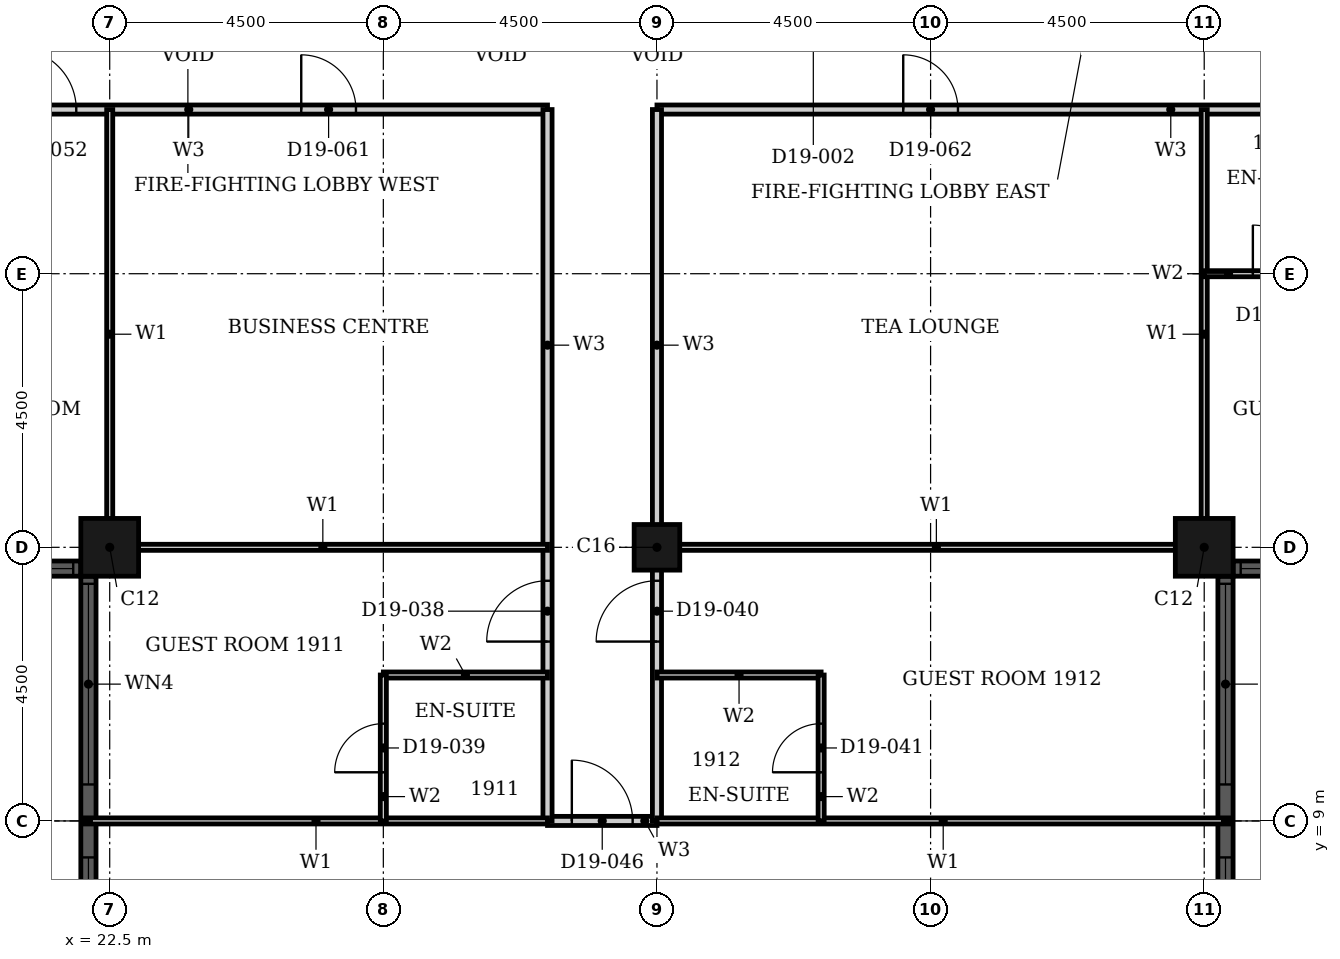
"""IFC4 building model, lengths in metres.
Left out: names, types, materials, properties, quantities, classifications, styles, units other than length and angle.
Written with IfcOpenShell. Run it as: python <this file> out.ifc"""

import sys

from ifc_helpers import new_model, si_unit, direction, frame, frame_2d, origin, origin_2d, place, context, subcontext, project, spatial, rectangle, hollow_rectangle, extrude, element, fill, save


model = new_model("IFC4")
c1 = context("Model", 3, precision=1e-05, world=origin(), true_north=direction((0.0, 1.0)))
c2 = subcontext(c1, "Body", "Model", "MODEL_VIEW")
j1 = project(units=[si_unit("LENGTHUNIT", "METRE"), si_unit("PLANEANGLEUNIT", "RADIAN")], contexts=[c1])
p1 = place(None, origin())
s1 = spatial("IfcSite", under=j1, at=p1, CompositionType="ELEMENT")
p2 = place(p1, origin())
s2 = spatial("IfcBuilding", under=s1, at=p2, CompositionType="ELEMENT")
p3 = place(p2, frame((0.0, 0.0, 81.6)))
s3 = spatial("IfcBuildingStorey", under=s2, at=p3, CompositionType="ELEMENT", Elevation=81.6)
for number, where, z_axis, x_axis in (
    (1, (40.5, 13.5, 0.0), (0.0, 0.0, 1.0), (1.0, 0.0, 0.0)),
    (2, (22.5, 13.5, 0.0), (0.0, 0.0, 1.0), (1.0, 0.0, 0.0)),
):
    element("IfcColumn", number, at=place(p3, frame(where, z_axis=z_axis, x_axis=x_axis)), inside=s3, PredefinedType="COLUMN", context=c2, shape_type="SweptSolid", body=[
        extrude(hollow_rectangle(XDim=0.95, YDim=0.95, WallThickness=0.03, at=origin_2d()), origin(), (0.0, 0.0, 1.0), 3.6),
    ])
p4 = place(p3, frame((31.5, 13.5, 0.0), z_axis=(0.0, 0.0, 1.0), x_axis=(1.0, 0.0, 0.0)))
e3 = element("IfcColumn", 3, at=p4, inside=s3, PredefinedType="COLUMN", context=c2, shape_type="SweptSolid", body=[
    extrude(hollow_rectangle(XDim=0.75, YDim=0.75, WallThickness=0.024, at=origin_2d()), origin(), (0.0, 0.0, 1.0), 3.6),
])
p5 = place(p3, frame((40.85, 4.975, 0.0), z_axis=(0.0, 0.0, 1.0), x_axis=(0.0, 1.0, 0.0)))
e4 = element("IfcWall", 4, at=p5, inside=s3, PredefinedType="SOLIDWALL", context=c2, shape_type="SweptSolid", body=[
    extrude(rectangle(XDim=8.05, YDim=0.25, at=frame_2d((4.025, 0.0))), origin(), (0.0, 0.0, 1.0), 3.6),
])
p6 = place(p5, frame((0.125, 0.0, 0.9)))
e5 = element("IfcOpeningElement", 5, at=p6, cuts=e4, PredefinedType="OPENING", context=c2, shape_type="SweptSolid", body=[
    extrude(rectangle(XDim=3.3, YDim=2.08, at=frame_2d((1.65, 1.04))), frame((0.0, 0.135, 0.0), z_axis=(0.0, -1.0, 0.0), x_axis=(1.0, 0.0, 0.0)), (0.0, 0.0, 1.0), 0.27),
])
p7 = place(p5, frame((4.625, 0.0, 0.9)))
e6 = element("IfcOpeningElement", 6, at=p7, cuts=e4, PredefinedType="OPENING", context=c2, shape_type="SweptSolid", body=[
    extrude(rectangle(XDim=3.3, YDim=2.08, at=frame_2d((1.65, 1.04))), frame((0.0, 0.135, 0.0), z_axis=(0.0, -1.0, 0.0), x_axis=(1.0, 0.0, 0.0)), (0.0, 0.0, 1.0), 0.27),
])
p8 = place(p3, frame((40.975, 13.15, 0.0), z_axis=(0.0, 0.0, 1.0), x_axis=(1.0, 0.0, 0.0)))
e7 = element("IfcWall", 7, at=p8, inside=s3, PredefinedType="SOLIDWALL", context=c2, shape_type="SweptSolid", body=[
    extrude(rectangle(XDim=3.55, YDim=0.25, at=frame_2d((1.775, 0.0))), origin(), (0.0, 0.0, 1.0), 3.6),
])
p9 = place(p8, frame((0.125, 0.0, 0.9)))
e8 = element("IfcOpeningElement", 8, at=p9, cuts=e7, PredefinedType="OPENING", context=c2, shape_type="SweptSolid", body=[
    extrude(rectangle(XDim=3.3, YDim=2.08, at=frame_2d((1.65, 1.04))), frame((0.0, 0.135, 0.0), z_axis=(0.0, -1.0, 0.0), x_axis=(1.0, 0.0, 0.0)), (0.0, 0.0, 1.0), 0.27),
])
p10 = place(p3, frame((18.475, 13.15, 0.0), z_axis=(0.0, 0.0, 1.0), x_axis=(1.0, 0.0, 0.0)))
e9 = element("IfcWall", 9, at=p10, inside=s3, PredefinedType="SOLIDWALL", context=c2, shape_type="SweptSolid", body=[
    extrude(rectangle(XDim=3.55, YDim=0.25, at=frame_2d((1.775, 0.0))), origin(), (0.0, 0.0, 1.0), 3.6),
])
p11 = place(p10, frame((0.125, 0.0, 0.9)))
e10 = element("IfcOpeningElement", 10, at=p11, cuts=e9, PredefinedType="OPENING", context=c2, shape_type="SweptSolid", body=[
    extrude(rectangle(XDim=3.3, YDim=2.08, at=frame_2d((1.65, 1.04))), frame((0.0, 0.135, 0.0), z_axis=(0.0, -1.0, 0.0), x_axis=(1.0, 0.0, 0.0)), (0.0, 0.0, 1.0), 0.27),
])
p12 = place(p3, frame((22.15, 13.025, 0.0), z_axis=(0.0, 0.0, 1.0), x_axis=(0.0, -1.0, 0.0)))
e11 = element("IfcWall", 11, at=p12, inside=s3, PredefinedType="SOLIDWALL", context=c2, shape_type="SweptSolid", body=[
    extrude(rectangle(XDim=8.05, YDim=0.25, at=frame_2d((4.025, 0.0))), origin(), (0.0, 0.0, 1.0), 3.6),
])
p13 = place(p12, frame((0.125, 0.0, 0.9)))
e12 = element("IfcOpeningElement", 12, at=p13, cuts=e11, PredefinedType="OPENING", context=c2, shape_type="SweptSolid", body=[
    extrude(rectangle(XDim=3.3, YDim=2.08, at=frame_2d((1.65, 1.04))), frame((0.0, 0.135, 0.0), z_axis=(0.0, -1.0, 0.0), x_axis=(1.0, 0.0, 0.0)), (0.0, 0.0, 1.0), 0.27),
])
p14 = place(p12, frame((4.625, 0.0, 0.9)))
e13 = element("IfcOpeningElement", 13, at=p14, cuts=e11, PredefinedType="OPENING", context=c2, shape_type="SweptSolid", body=[
    extrude(rectangle(XDim=3.3, YDim=2.08, at=frame_2d((1.65, 1.04))), frame((0.0, 0.135, 0.0), z_axis=(0.0, -1.0, 0.0), x_axis=(1.0, 0.0, 0.0)), (0.0, 0.0, 1.0), 0.27),
])
p15 = place(p3, frame((31.5, 20.7, 0.0), z_axis=(0.0, 0.0, 1.0), x_axis=(1.0, 0.0, 0.0)))
e14 = element("IfcWall", 14, at=p15, inside=s3, PredefinedType="PARTITIONING", context=c2, shape_type="SweptSolid", body=[
    extrude(rectangle(XDim=15.3, YDim=0.15, at=frame_2d((7.65, 0.0))), origin(), (0.0, 0.0, 1.0), 3.3),
])
p16 = place(p15, frame((11.95, 0.0, 0.0)))
e15 = element("IfcOpeningElement", 15, at=p16, cuts=e14, PredefinedType="OPENING", context=c2, shape_type="SweptSolid", body=[
    extrude(rectangle(XDim=1.0, YDim=2.1, at=frame_2d((0.5, 1.05))), frame((0.0, 0.085, 0.0), z_axis=(0.0, -1.0, 0.0), x_axis=(1.0, 0.0, 0.0)), (0.0, 0.0, 1.0), 0.17),
])
p17 = place(p15, frame((13.95, 0.0, 0.0)))
e16 = element("IfcOpeningElement", 16, at=p17, cuts=e14, PredefinedType="OPENING", context=c2, shape_type="SweptSolid", body=[
    extrude(rectangle(XDim=0.9, YDim=2.1, at=frame_2d((0.45, 1.05))), frame((0.0, 0.085, 0.0), z_axis=(0.0, -1.0, 0.0), x_axis=(1.0, 0.0, 0.0)), (0.0, 0.0, 1.0), 0.17),
])
p18 = place(p15, frame((4.05, 0.0, 0.0)))
e17 = element("IfcOpeningElement", 17, at=p18, cuts=e14, PredefinedType="OPENING", context=c2, shape_type="SweptSolid", body=[
    extrude(rectangle(XDim=0.9, YDim=2.1, at=frame_2d((0.45, 1.05))), frame((0.0, 0.085, 0.0), z_axis=(0.0, -1.0, 0.0), x_axis=(1.0, 0.0, 0.0)), (0.0, 0.0, 1.0), 0.17),
])
p19 = place(p3, frame((16.2, 20.7, 0.0), z_axis=(0.0, 0.0, 1.0), x_axis=(1.0, 0.0, 0.0)))
e18 = element("IfcWall", 18, at=p19, inside=s3, PredefinedType="PARTITIONING", context=c2, shape_type="SweptSolid", body=[
    extrude(rectangle(XDim=13.5, YDim=0.15, at=frame_2d((6.75, 0.0))), origin(), (0.0, 0.0, 1.0), 3.3),
])
p20 = place(p19, frame((4.75, 0.0, 0.0)))
e19 = element("IfcOpeningElement", 19, at=p20, cuts=e18, PredefinedType="OPENING", context=c2, shape_type="SweptSolid", body=[
    extrude(rectangle(XDim=1.0, YDim=2.1, at=frame_2d((0.5, 1.05))), frame((0.0, 0.085, 0.0), z_axis=(0.0, -1.0, 0.0), x_axis=(1.0, 0.0, 0.0)), (0.0, 0.0, 1.0), 0.17),
])
p21 = place(p19, frame((0.45, 0.0, 0.0)))
e20 = element("IfcOpeningElement", 20, at=p21, cuts=e18, PredefinedType="OPENING", context=c2, shape_type="SweptSolid", body=[
    extrude(rectangle(XDim=0.9, YDim=2.1, at=frame_2d((0.45, 1.05))), frame((0.0, 0.085, 0.0), z_axis=(0.0, -1.0, 0.0), x_axis=(1.0, 0.0, 0.0)), (0.0, 0.0, 1.0), 0.17),
])
p22 = place(p19, frame((9.45, 0.0, 0.0)))
e21 = element("IfcOpeningElement", 21, at=p22, cuts=e18, PredefinedType="OPENING", context=c2, shape_type="SweptSolid", body=[
    extrude(rectangle(XDim=0.9, YDim=2.1, at=frame_2d((0.45, 1.05))), frame((0.0, 0.085, 0.0), z_axis=(0.0, -1.0, 0.0), x_axis=(1.0, 0.0, 0.0)), (0.0, 0.0, 1.0), 0.17),
])
p23 = place(p3, frame((29.7, 9.0, 0.0), z_axis=(0.0, 0.0, 1.0), x_axis=(1.0, 0.0, 0.0)))
e22 = element("IfcWall", 22, at=p23, inside=s3, PredefinedType="PARTITIONING", context=c2, shape_type="SweptSolid", body=[
    extrude(rectangle(XDim=1.8, YDim=0.15, at=frame_2d((0.9, 0.0))), origin(), (0.0, 0.0, 1.0), 3.3),
])
p24 = place(p23, frame((0.4, 0.0, 0.0)))
e23 = element("IfcOpeningElement", 23, at=p24, cuts=e22, PredefinedType="OPENING", context=c2, shape_type="SweptSolid", body=[
    extrude(rectangle(XDim=1.0, YDim=2.1, at=frame_2d((0.5, 1.05))), frame((0.0, 0.085, 0.0), z_axis=(0.0, -1.0, 0.0), x_axis=(1.0, 0.0, 0.0)), (0.0, 0.0, 1.0), 0.17),
])
p25 = place(p3, frame((29.7, 9.0, 0.0), z_axis=(0.0, 0.0, 1.0), x_axis=(0.0, 1.0, 0.0)))
e24 = element("IfcWall", 24, at=p25, inside=s3, PredefinedType="PARTITIONING", context=c2, shape_type="SweptSolid", body=[
    extrude(rectangle(XDim=11.7, YDim=0.15, at=frame_2d((5.85, 0.0))), origin(), (0.0, 0.0, 1.0), 3.3),
])
p26 = place(p25, frame((2.95, 0.0, 0.0)))
e25 = element("IfcOpeningElement", 25, at=p26, cuts=e24, PredefinedType="OPENING", context=c2, shape_type="SweptSolid", body=[
    extrude(rectangle(XDim=1.0, YDim=2.1, at=frame_2d((0.5, 1.05))), frame((0.0, 0.085, 0.0), z_axis=(0.0, -1.0, 0.0), x_axis=(1.0, 0.0, 0.0)), (0.0, 0.0, 1.0), 0.17),
])
p27 = place(p3, frame((31.5, 9.0, 0.0), z_axis=(0.0, 0.0, 1.0), x_axis=(0.0, 1.0, 0.0)))
e26 = element("IfcWall", 26, at=p27, inside=s3, PredefinedType="PARTITIONING", context=c2, shape_type="SweptSolid", body=[
    extrude(rectangle(XDim=11.7, YDim=0.15, at=frame_2d((5.85, 0.0))), origin(), (0.0, 0.0, 1.0), 2.58),
])
p28 = place(p27, frame((2.95, 0.0, 0.0)))
e27 = element("IfcOpeningElement", 27, at=p28, cuts=e26, PredefinedType="OPENING", context=c2, shape_type="SweptSolid", body=[
    extrude(rectangle(XDim=1.0, YDim=2.1, at=frame_2d((0.5, 1.05))), frame((0.0, 0.085, 0.0), z_axis=(0.0, -1.0, 0.0), x_axis=(1.0, 0.0, 0.0)), (0.0, 0.0, 1.0), 0.17),
])
p29 = place(p3, frame((31.5, 13.5, 0.0), z_axis=(0.0, 0.0, 1.0), x_axis=(1.0, 0.0, 0.0)))
e28 = element("IfcWall", 28, at=p29, inside=s3, PredefinedType="PARTITIONING", context=c2, shape_type="SweptSolid", body=[
    extrude(rectangle(XDim=9.19, YDim=0.1, at=frame_2d((4.595, 0.0))), origin(), (0.0, 0.0, 1.0), 2.38),
])
p30 = place(p3, frame((22.31, 13.5, 0.0), z_axis=(0.0, 0.0, 1.0), x_axis=(1.0, 0.0, 0.0)))
e29 = element("IfcWall", 29, at=p30, inside=s3, PredefinedType="PARTITIONING", context=c2, shape_type="SweptSolid", body=[
    extrude(rectangle(XDim=7.39, YDim=0.1, at=frame_2d((3.695, 0.0))), origin(), (0.0, 0.0, 1.0), 2.38),
])
p31 = place(p3, frame((31.5, 9.0, 0.0), z_axis=(0.0, 0.0, 1.0), x_axis=(1.0, 0.0, 0.0)))
e30 = element("IfcWall", 30, at=p31, inside=s3, PredefinedType="PARTITIONING", context=c2, shape_type="SweptSolid", body=[
    extrude(rectangle(XDim=9.415, YDim=0.1, at=frame_2d((4.708, 0.0))), origin(), (0.0, 0.0, 1.0), 3.3),
])
p32 = place(p3, frame((22.085, 9.0, 0.0), z_axis=(0.0, 0.0, 1.0), x_axis=(1.0, 0.0, 0.0)))
e31 = element("IfcWall", 31, at=p32, inside=s3, PredefinedType="PARTITIONING", context=c2, shape_type="SweptSolid", body=[
    extrude(rectangle(XDim=7.615, YDim=0.1, at=frame_2d((3.808, 0.0))), origin(), (0.0, 0.0, 1.0), 3.3),
])
for number, where, z_axis, x_axis in (
    (32, (22.5, 13.31, 0.0), (0.0, 0.0, 1.0), (0.0, 1.0, 0.0)),
    (33, (40.5, 13.31, 0.0), (0.0, 0.0, 1.0), (0.0, 1.0, 0.0)),
):
    element("IfcWall", number, at=place(p3, frame(where, z_axis=z_axis, x_axis=x_axis)), inside=s3, PredefinedType="PARTITIONING", context=c2, shape_type="SweptSolid", body=[
        extrude(rectangle(XDim=7.39, YDim=0.1, at=frame_2d((3.695, 0.0))), origin(), (0.0, 0.0, 1.0), 3.3),
    ])
for number, where, z_axis, x_axis in (
    (34, (31.5, 11.4, 0.0), (0.0, 0.0, 1.0), (1.0, 0.0, 0.0)),
    (35, (27.0, 11.4, 0.0), (0.0, 0.0, 1.0), (1.0, 0.0, 0.0)),
):
    element("IfcWall", number, at=place(p3, frame(where, z_axis=z_axis, x_axis=x_axis)), inside=s3, PredefinedType="PARTITIONING", context=c2, shape_type="SweptSolid", body=[
        extrude(rectangle(XDim=2.7, YDim=0.1, at=frame_2d((1.35, 0.0))), origin(), (0.0, 0.0, 1.0), 3.3),
    ])
p33 = place(p3, frame((40.5, 18.0, 0.0), z_axis=(0.0, 0.0, 1.0), x_axis=(1.0, 0.0, 0.0)))
e36 = element("IfcWall", 36, at=p33, inside=s3, PredefinedType="PARTITIONING", context=c2, shape_type="SweptSolid", body=[
    extrude(rectangle(XDim=2.4, YDim=0.1, at=frame_2d((1.2, 0.0))), origin(), (0.0, 0.0, 1.0), 3.3),
])
p34 = place(p33, frame((0.8, 0.0, 0.0)))
e37 = element("IfcOpeningElement", 37, at=p34, cuts=e36, PredefinedType="OPENING", context=c2, shape_type="SweptSolid", body=[
    extrude(rectangle(XDim=0.8, YDim=2.1, at=frame_2d((0.4, 1.05))), frame((0.0, 0.06, 0.0), z_axis=(0.0, -1.0, 0.0), x_axis=(1.0, 0.0, 0.0)), (0.0, 0.0, 1.0), 0.12),
])
p35 = place(p3, frame((27.0, 9.0, 0.0), z_axis=(0.0, 0.0, 1.0), x_axis=(0.0, 1.0, 0.0)))
e38 = element("IfcWall", 38, at=p35, inside=s3, PredefinedType="PARTITIONING", context=c2, shape_type="SweptSolid", body=[
    extrude(rectangle(XDim=2.4, YDim=0.1, at=frame_2d((1.2, 0.0))), origin(), (0.0, 0.0, 1.0), 2.58),
])
p36 = place(p35, frame((0.8, 0.0, 0.0)))
e39 = element("IfcOpeningElement", 39, at=p36, cuts=e38, PredefinedType="OPENING", context=c2, shape_type="SweptSolid", body=[
    extrude(rectangle(XDim=0.8, YDim=2.1, at=frame_2d((0.4, 1.05))), frame((0.0, 0.06, 0.0), z_axis=(0.0, -1.0, 0.0), x_axis=(1.0, 0.0, 0.0)), (0.0, 0.0, 1.0), 0.12),
])
p37 = place(p3, frame((34.2, 9.0, 0.0), z_axis=(0.0, 0.0, 1.0), x_axis=(0.0, 1.0, 0.0)))
e40 = element("IfcWall", 40, at=p37, inside=s3, PredefinedType="PARTITIONING", context=c2, shape_type="SweptSolid", body=[
    extrude(rectangle(XDim=2.4, YDim=0.1, at=frame_2d((1.2, 0.0))), origin(), (0.0, 0.0, 1.0), 3.3),
])
p38 = place(p37, frame((0.8, 0.0, 0.0)))
e41 = element("IfcOpeningElement", 41, at=p38, cuts=e40, PredefinedType="OPENING", context=c2, shape_type="SweptSolid", body=[
    extrude(rectangle(XDim=0.8, YDim=2.1, at=frame_2d((0.4, 1.05))), frame((0.0, 0.06, 0.0), z_axis=(0.0, -1.0, 0.0), x_axis=(1.0, 0.0, 0.0)), (0.0, 0.0, 1.0), 0.12),
])
p39 = place(p6, origin())
e42 = element("IfcWindow", 42, at=p39, inside=s3, PartitioningType="SINGLE_PANEL", PredefinedType="WINDOW", context=c2, shape_type="SweptSolid", body=[
    extrude(rectangle(XDim=3.3, YDim=2.08, at=frame_2d((1.65, 1.04))), frame((0.0, 0.03, 0.0), z_axis=(0.0, -1.0, 0.0), x_axis=(1.0, 0.0, 0.0)), (0.0, 0.0, 1.0), 0.06),
])
fill(e5, e42)
p40 = place(p7, origin())
e43 = element("IfcWindow", 43, at=p40, inside=s3, PartitioningType="SINGLE_PANEL", PredefinedType="WINDOW", context=c2, shape_type="SweptSolid", body=[
    extrude(rectangle(XDim=3.3, YDim=2.08, at=frame_2d((1.65, 1.04))), frame((0.0, 0.03, 0.0), z_axis=(0.0, -1.0, 0.0), x_axis=(1.0, 0.0, 0.0)), (0.0, 0.0, 1.0), 0.06),
])
fill(e6, e43)
p41 = place(p9, origin())
e44 = element("IfcWindow", 44, at=p41, inside=s3, PartitioningType="SINGLE_PANEL", PredefinedType="WINDOW", context=c2, shape_type="SweptSolid", body=[
    extrude(rectangle(XDim=3.3, YDim=2.08, at=frame_2d((1.65, 1.04))), frame((0.0, 0.03, 0.0), z_axis=(0.0, -1.0, 0.0), x_axis=(1.0, 0.0, 0.0)), (0.0, 0.0, 1.0), 0.06),
])
fill(e8, e44)
p42 = place(p11, origin())
e45 = element("IfcWindow", 45, at=p42, inside=s3, PartitioningType="SINGLE_PANEL", PredefinedType="WINDOW", context=c2, shape_type="SweptSolid", body=[
    extrude(rectangle(XDim=3.3, YDim=2.08, at=frame_2d((1.65, 1.04))), frame((0.0, 0.03, 0.0), z_axis=(0.0, -1.0, 0.0), x_axis=(1.0, 0.0, 0.0)), (0.0, 0.0, 1.0), 0.06),
])
fill(e10, e45)
p43 = place(p13, origin())
e46 = element("IfcWindow", 46, at=p43, inside=s3, PartitioningType="SINGLE_PANEL", PredefinedType="WINDOW", context=c2, shape_type="SweptSolid", body=[
    extrude(rectangle(XDim=3.3, YDim=2.08, at=frame_2d((1.65, 1.04))), frame((0.0, 0.03, 0.0), z_axis=(0.0, -1.0, 0.0), x_axis=(1.0, 0.0, 0.0)), (0.0, 0.0, 1.0), 0.06),
])
fill(e12, e46)
p44 = place(p14, origin())
e47 = element("IfcWindow", 47, at=p44, inside=s3, PartitioningType="SINGLE_PANEL", PredefinedType="WINDOW", context=c2, shape_type="SweptSolid", body=[
    extrude(rectangle(XDim=3.3, YDim=2.08, at=frame_2d((1.65, 1.04))), frame((0.0, 0.03, 0.0), z_axis=(0.0, -1.0, 0.0), x_axis=(1.0, 0.0, 0.0)), (0.0, 0.0, 1.0), 0.06),
])
fill(e13, e47)
p45 = place(p26, origin())
e48 = element("IfcDoor", 48, at=p45, inside=s3, OperationType="SINGLE_SWING_RIGHT", PredefinedType="DOOR", context=c2, shape_type="SweptSolid", body=[
    extrude(rectangle(XDim=1.0, YDim=2.1, at=frame_2d((0.5, 1.05))), frame((0.0, 0.025, 0.0), z_axis=(0.0, -1.0, 0.0), x_axis=(1.0, 0.0, 0.0)), (0.0, 0.0, 1.0), 0.05),
])
fill(e25, e48)
p46 = place(p36, origin())
e49 = element("IfcDoor", 49, at=p46, inside=s3, OperationType="SINGLE_SWING_RIGHT", PredefinedType="DOOR", context=c2, shape_type="SweptSolid", body=[
    extrude(rectangle(XDim=0.8, YDim=2.1, at=frame_2d((0.4, 1.05))), frame((0.0, 0.025, 0.0), z_axis=(0.0, -1.0, 0.0), x_axis=(1.0, 0.0, 0.0)), (0.0, 0.0, 1.0), 0.05),
])
fill(e39, e49)
p47 = place(p28, origin())
e50 = element("IfcDoor", 50, at=p47, inside=s3, OperationType="SINGLE_SWING_RIGHT", PredefinedType="DOOR", context=c2, shape_type="SweptSolid", body=[
    extrude(rectangle(XDim=1.0, YDim=2.1, at=frame_2d((0.5, 1.05))), frame((0.0, 0.025, 0.0), z_axis=(0.0, -1.0, 0.0), x_axis=(1.0, 0.0, 0.0)), (0.0, 0.0, 1.0), 0.05),
])
fill(e27, e50)
p48 = place(p38, origin())
e51 = element("IfcDoor", 51, at=p48, inside=s3, OperationType="SINGLE_SWING_LEFT", PredefinedType="DOOR", context=c2, shape_type="SweptSolid", body=[
    extrude(rectangle(XDim=0.8, YDim=2.1, at=frame_2d((0.4, 1.05))), frame((0.0, 0.025, 0.0), z_axis=(0.0, -1.0, 0.0), x_axis=(1.0, 0.0, 0.0)), (0.0, 0.0, 1.0), 0.05),
])
fill(e41, e51)
p49 = place(p24, origin())
e52 = element("IfcDoor", 52, at=p49, inside=s3, OperationType="SINGLE_SWING_LEFT", PredefinedType="DOOR", context=c2, shape_type="SweptSolid", body=[
    extrude(rectangle(XDim=1.0, YDim=2.1, at=frame_2d((0.5, 1.05))), frame((0.0, 0.025, 0.0), z_axis=(0.0, -1.0, 0.0), x_axis=(1.0, 0.0, 0.0)), (0.0, 0.0, 1.0), 0.05),
])
fill(e23, e52)
p50 = place(p20, origin())
e53 = element("IfcDoor", 53, at=p50, inside=s3, OperationType="SINGLE_SWING_RIGHT", PredefinedType="DOOR", context=c2, shape_type="SweptSolid", body=[
    extrude(rectangle(XDim=1.0, YDim=2.1, at=frame_2d((0.5, 1.05))), frame((0.0, 0.025, 0.0), z_axis=(0.0, -1.0, 0.0), x_axis=(1.0, 0.0, 0.0)), (0.0, 0.0, 1.0), 0.05),
])
fill(e19, e53)
p51 = place(p34, origin())
e54 = element("IfcDoor", 54, at=p51, inside=s3, OperationType="SINGLE_SWING_LEFT", PredefinedType="DOOR", context=c2, shape_type="SweptSolid", body=[
    extrude(rectangle(XDim=0.8, YDim=2.1, at=frame_2d((0.4, 1.05))), frame((0.0, 0.025, 0.0), z_axis=(0.0, -1.0, 0.0), x_axis=(1.0, 0.0, 0.0)), (0.0, 0.0, 1.0), 0.05),
])
fill(e37, e54)
p52 = place(p22, origin())
e55 = element("IfcDoor", 55, at=p52, inside=s3, OperationType="SINGLE_SWING_LEFT", PredefinedType="DOOR", context=c2, shape_type="SweptSolid", body=[
    extrude(rectangle(XDim=0.9, YDim=2.1, at=frame_2d((0.45, 1.05))), frame((0.0, 0.025, 0.0), z_axis=(0.0, -1.0, 0.0), x_axis=(1.0, 0.0, 0.0)), (0.0, 0.0, 1.0), 0.05),
])
fill(e21, e55)
p53 = place(p18, origin())
e56 = element("IfcDoor", 56, at=p53, inside=s3, OperationType="SINGLE_SWING_RIGHT", PredefinedType="DOOR", context=c2, shape_type="SweptSolid", body=[
    extrude(rectangle(XDim=0.9, YDim=2.1, at=frame_2d((0.45, 1.05))), frame((0.0, 0.025, 0.0), z_axis=(0.0, -1.0, 0.0), x_axis=(1.0, 0.0, 0.0)), (0.0, 0.0, 1.0), 0.05),
])
fill(e17, e56)
save(model, sys.argv[1])
